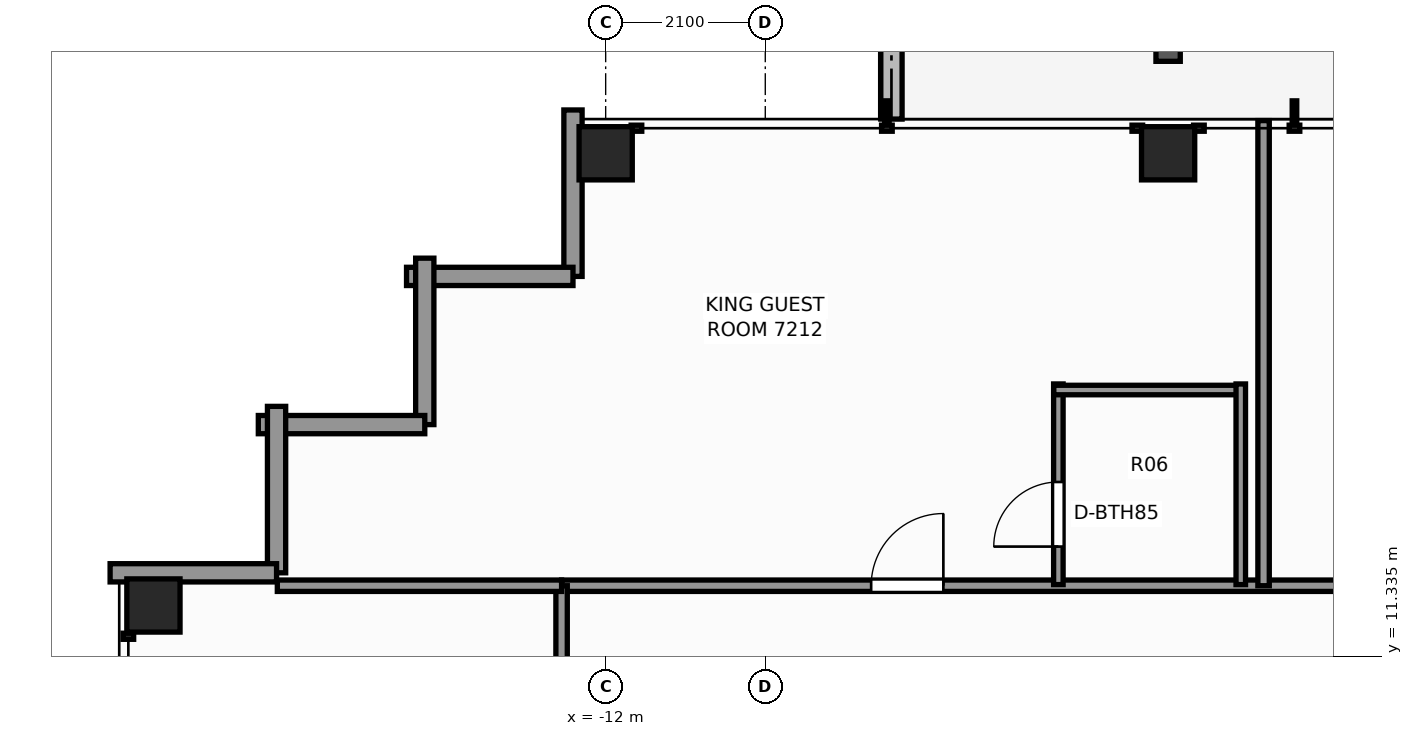
"""IFC4 building model, lengths in metres.
Left out: names, types, materials, properties, quantities, classifications, styles, units other than length and angle.
Written with IfcOpenShell. Run it as: python <this file> out.ifc"""

import sys

from ifc_helpers import new_model, si_unit, direction, frame, frame_2d, origin, origin_2d, place, context, subcontext, project, spatial, rectangle, extrude, element, fill, save


model = new_model("IFC4")
c1 = context("Model", 3, precision=1e-05, world=origin(), true_north=direction((0.0, 1.0)))
c2 = subcontext(c1, "Body", "Model", "MODEL_VIEW")
j1 = project(units=[si_unit("LENGTHUNIT", "METRE"), si_unit("PLANEANGLEUNIT", "RADIAN")], contexts=[c1])
p1 = place(None, origin())
s1 = spatial("IfcSite", under=j1, at=p1, CompositionType="ELEMENT")
p2 = place(p1, origin())
s2 = spatial("IfcBuilding", under=s1, at=p2, CompositionType="ELEMENT")
p3 = place(p2, frame((0.0, 0.0, 247.9)))
s3 = spatial("IfcBuildingStorey", under=s2, at=p3, CompositionType="ELEMENT", Elevation=247.9)
for number, where, z_axis, x_axis in (
    (1, (-12.0, 17.95, 0.0), (0.0, 0.0, 1.0), (1.0, 0.0, 0.0)),
    (2, (-4.6, 17.95, 0.0), (0.0, 0.0, 1.0), (1.0, 0.0, 0.0)),
    (3, (-17.95, 12.0, 0.0), (0.0, 0.0, 1.0), (1.0, 0.0, 0.0)),
):
    element("IfcColumn", number, at=place(p3, frame(where, z_axis=z_axis, x_axis=x_axis)), inside=s3, PredefinedType="COLUMN", context=c2, shape_type="SweptSolid", body=[
        extrude(rectangle(XDim=0.7, YDim=0.7, at=origin_2d()), origin(), (0.0, 0.0, 1.0), 3.5),
    ])
p4 = place(p3, frame((-8.24, 21.375, -0.07), z_axis=(0.0, 0.0, 1.0), x_axis=(0.0, -1.0, 0.0)))
e4 = element("IfcWall", 4, at=p4, inside=s3, PredefinedType="PARAPET", context=c2, shape_type="SweptSolid", body=[
    extrude(rectangle(XDim=2.975, YDim=0.28, at=frame_2d((1.487, 0.0))), origin(), (0.0, 0.0, 1.0), 0.42),
])
p5 = place(p3, frame((-12.43, 16.33, 0.0), z_axis=(0.0, 0.0, 1.0), x_axis=(0.0, 1.0, 0.0)))
e5 = element("IfcWall", 5, at=p5, inside=s3, PredefinedType="STANDARD", context=c2, shape_type="SweptSolid", body=[
    extrude(rectangle(XDim=2.19, YDim=0.24, at=frame_2d((1.095, 0.0))), origin(), (0.0, 0.0, 1.0), 2.633),
])
for number, where, z_axis, x_axis in (
    (6, (-14.62, 16.33, 0.0), (0.0, 0.0, 1.0), (1.0, 0.0, 0.0)),
    (7, (-14.38, 14.38, 0.0), (0.0, 0.0, 1.0), (0.0, 1.0, 0.0)),
    (8, (-16.57, 14.38, 0.0), (0.0, 0.0, 1.0), (1.0, 0.0, 0.0)),
    (9, (-16.33, 12.43, 0.0), (0.0, 0.0, 1.0), (0.0, 1.0, 0.0)),
):
    element("IfcWall", number, at=place(p3, frame(where, z_axis=z_axis, x_axis=x_axis)), inside=s3, PredefinedType="STANDARD", context=c2, shape_type="SweptSolid", body=[
        extrude(rectangle(XDim=2.19, YDim=0.24, at=frame_2d((1.095, 0.0))), origin(), (0.0, 0.0, 1.0), 2.633),
    ])
p6 = place(p3, frame((-18.52, 12.43, 0.0), z_axis=(0.0, 0.0, 1.0), x_axis=(1.0, 0.0, 0.0)))
e10 = element("IfcWall", 10, at=p6, inside=s3, PredefinedType="STANDARD", context=c2, shape_type="SweptSolid", body=[
    extrude(rectangle(XDim=2.19, YDim=0.24, at=frame_2d((1.095, 0.0))), origin(), (0.0, 0.0, 1.0), 2.633),
])
p7 = place(p3, frame((-12.58, 12.26, 0.0), z_axis=(0.0, 0.0, 1.0), x_axis=(1.0, 0.0, 0.0)))
e11 = element("IfcWall", 11, at=p7, inside=s3, PredefinedType="PARTITIONING", context=c2, shape_type="SweptSolid", body=[
    extrude(rectangle(XDim=24.84, YDim=0.15, at=frame_2d((12.42, 0.0))), origin(), (0.0, 0.0, 1.0), 2.539),
])
p8 = place(p7, frame((4.073, 0.0, 0.0)))
e12 = element("IfcOpeningElement", 12, at=p8, cuts=e11, PredefinedType="OPENING", context=c2, shape_type="SweptSolid", body=[
    extrude(rectangle(XDim=0.95, YDim=2.06, at=frame_2d((0.475, 1.03))), frame((0.0, 0.085, 0.0), z_axis=(0.0, -1.0, 0.0), x_axis=(1.0, 0.0, 0.0)), (0.0, 0.0, 1.0), 0.17),
])
p9 = place(p7, frame((19.665, 0.0, 0.0)))
e13 = element("IfcOpeningElement", 13, at=p9, cuts=e11, PredefinedType="OPENING", context=c2, shape_type="SweptSolid", body=[
    extrude(rectangle(XDim=0.9, YDim=2.06, at=frame_2d((0.45, 1.03))), frame((0.0, 0.085, 0.0), z_axis=(0.0, -1.0, 0.0), x_axis=(1.0, 0.0, 0.0)), (0.0, 0.0, 1.0), 0.17),
])
p10 = place(p3, frame((-12.58, -12.58, 0.0), z_axis=(0.0, 0.0, 1.0), x_axis=(0.0, 1.0, 0.0)))
e14 = element("IfcWall", 14, at=p10, inside=s3, PredefinedType="PARTITIONING", context=c2, shape_type="SweptSolid", body=[
    extrude(rectangle(XDim=24.84, YDim=0.15, at=frame_2d((12.42, 0.0))), origin(), (0.0, 0.0, 1.0), 2.539),
])
p11 = place(p10, frame((3.104, 0.0, 0.0)))
e15 = element("IfcOpeningElement", 15, at=p11, cuts=e14, PredefinedType="OPENING", context=c2, shape_type="SweptSolid", body=[
    extrude(rectangle(XDim=0.9, YDim=2.06, at=frame_2d((0.45, 1.03))), frame((0.0, 0.085, 0.0), z_axis=(0.0, -1.0, 0.0), x_axis=(1.0, 0.0, 0.0)), (0.0, 0.0, 1.0), 0.17),
])
p12 = place(p10, frame((9.119, 0.0, 0.0)))
e16 = element("IfcOpeningElement", 16, at=p12, cuts=e14, PredefinedType="OPENING", context=c2, shape_type="SweptSolid", body=[
    extrude(rectangle(XDim=0.95, YDim=2.06, at=frame_2d((0.475, 1.03))), frame((0.0, 0.085, 0.0), z_axis=(0.0, -1.0, 0.0), x_axis=(1.0, 0.0, 0.0)), (0.0, 0.0, 1.0), 0.17),
])
p13 = place(p10, frame((14.5, 0.0, 0.0)))
e17 = element("IfcOpeningElement", 17, at=p13, cuts=e14, PredefinedType="OPENING", context=c2, shape_type="SweptSolid", body=[
    extrude(rectangle(XDim=0.95, YDim=2.06, at=frame_2d((0.475, 1.03))), frame((0.0, 0.085, 0.0), z_axis=(0.0, -1.0, 0.0), x_axis=(1.0, 0.0, 0.0)), (0.0, 0.0, 1.0), 0.17),
])
p14 = place(p10, frame((20.534, 0.0, 0.0)))
e18 = element("IfcOpeningElement", 18, at=p14, cuts=e14, PredefinedType="OPENING", context=c2, shape_type="SweptSolid", body=[
    extrude(rectangle(XDim=0.95, YDim=2.06, at=frame_2d((0.475, 1.03))), frame((0.0, 0.085, 0.0), z_axis=(0.0, -1.0, 0.0), x_axis=(1.0, 0.0, 0.0)), (0.0, 0.0, 1.0), 0.17),
])
p15 = place(p3, frame((-16.32, 12.26, 0.0), z_axis=(0.0, 0.0, 1.0), x_axis=(1.0, 0.0, 0.0)))
e19 = element("IfcWall", 19, at=p15, inside=s3, PredefinedType="PARTITIONING", context=c2, shape_type="SweptSolid", body=[
    extrude(rectangle(XDim=3.74, YDim=0.15, at=frame_2d((1.87, 0.0))), origin(), (0.0, 0.0, 1.0), 3.25),
])
p16 = place(p3, frame((-3.344, 12.26, 0.0), z_axis=(0.0, 0.0, 1.0), x_axis=(0.0, 1.0, 0.0)))
e20 = element("IfcWall", 20, at=p16, inside=s3, PredefinedType="PARTITIONING", context=c2, shape_type="SweptSolid", body=[
    extrude(rectangle(XDim=6.12, YDim=0.15, at=frame_2d((3.06, 0.0))), origin(), (0.0, 0.0, 1.0), 2.539),
])
p17 = place(p3, frame((-6.044, 12.275, 0.0), z_axis=(0.0, 0.0, 1.0), x_axis=(0.0, 1.0, 0.0)))
e21 = element("IfcWall", 21, at=p17, inside=s3, PredefinedType="PARTITIONING", context=c2, shape_type="SweptSolid", body=[
    extrude(rectangle(XDim=2.64, YDim=0.125, at=frame_2d((1.32, 0.0))), origin(), (0.0, 0.0, 1.0), 3.25),
])
p18 = place(p17, frame((0.5, 0.0, 0.0)))
e22 = element("IfcOpeningElement", 22, at=p18, cuts=e21, PredefinedType="OPENING", context=c2, shape_type="SweptSolid", body=[
    extrude(rectangle(XDim=0.85, YDim=2.03, at=frame_2d((0.425, 1.015))), frame((0.0, 0.073, 0.0), z_axis=(0.0, -1.0, 0.0), x_axis=(1.0, 0.0, 0.0)), (0.0, 0.0, 1.0), 0.145),
])
p19 = place(p3, frame((-6.104, 14.835, 0.0), z_axis=(0.0, 0.0, 1.0), x_axis=(1.0, 0.0, 0.0)))
e23 = element("IfcWall", 23, at=p19, inside=s3, PredefinedType="PARTITIONING", context=c2, shape_type="SweptSolid", body=[
    extrude(rectangle(XDim=2.52, YDim=0.125, at=frame_2d((1.26, 0.0))), origin(), (0.0, 0.0, 1.0), 2.539),
])
p20 = place(p3, frame((-3.644, 12.275, 0.0), z_axis=(0.0, 0.0, 1.0), x_axis=(0.0, 1.0, 0.0)))
e24 = element("IfcWall", 24, at=p20, inside=s3, PredefinedType="PARTITIONING", context=c2, shape_type="SweptSolid", body=[
    extrude(rectangle(XDim=2.64, YDim=0.125, at=frame_2d((1.32, 0.0))), origin(), (0.0, 0.0, 1.0), 3.25),
])
p21 = place(p18, origin())
e25 = element("IfcDoor", 25, at=p21, inside=s3, OperationType="SINGLE_SWING_LEFT", PredefinedType="DOOR", context=c2, shape_type="SweptSolid", body=[
    extrude(rectangle(XDim=0.85, YDim=2.03, at=frame_2d((0.425, 1.015))), frame((0.0, 0.025, 0.0), z_axis=(0.0, -1.0, 0.0), x_axis=(1.0, 0.0, 0.0)), (0.0, 0.0, 1.0), 0.05),
])
fill(e22, e25)
p22 = place(p8, origin())
e26 = element("IfcDoor", 26, at=p22, inside=s3, OperationType="SINGLE_SWING_RIGHT", PredefinedType="DOOR", context=c2, shape_type="SweptSolid", body=[
    extrude(rectangle(XDim=0.95, YDim=2.06, at=frame_2d((0.475, 1.03))), frame((0.0, 0.025, 0.0), z_axis=(0.0, -1.0, 0.0), x_axis=(1.0, 0.0, 0.0)), (0.0, 0.0, 1.0), 0.05),
])
fill(e12, e26)
save(model, sys.argv[1])
